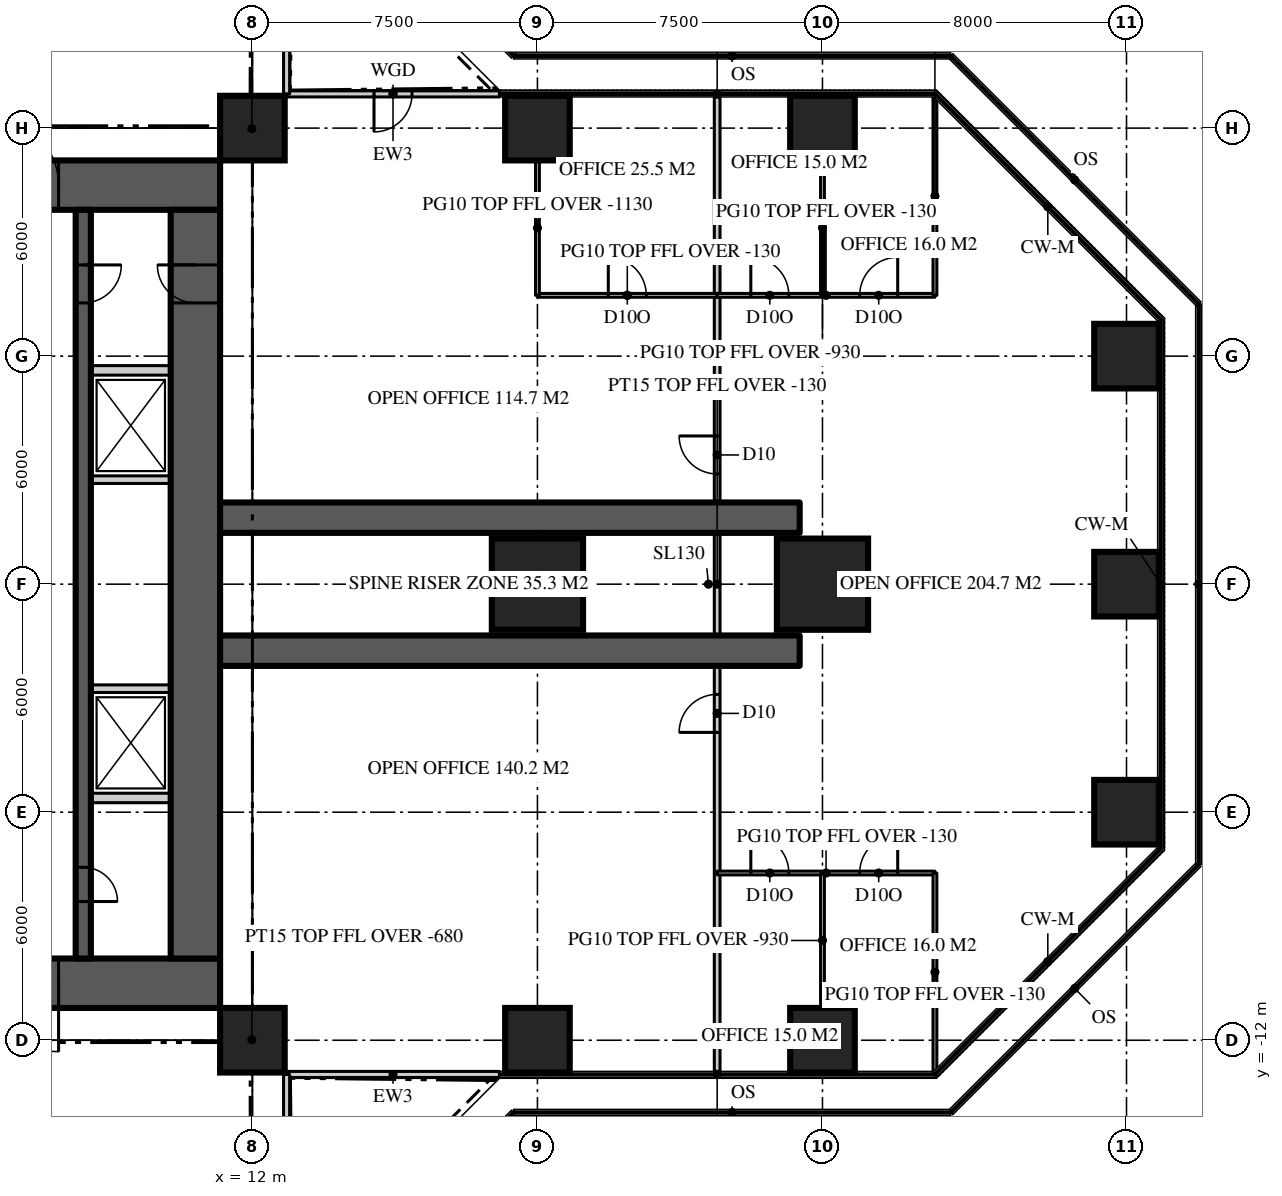
"""IFC4 building model, lengths in metres.
Left out: names, types, materials, properties, quantities, classifications, styles, units other than length and angle.
Written with IfcOpenShell. Run it as: python <this file> out.ifc"""

import sys

from ifc_helpers import new_model, si_unit, direction, frame, frame_2d, origin, origin_2d, place, context, subcontext, project, spatial, rectangle, extrude, element, fill, save


model = new_model("IFC4")
c1 = context("Model", 3, precision=1e-05, world=origin(), true_north=direction((0.0, 1.0)))
c2 = subcontext(c1, "Body", "Model", "MODEL_VIEW")
j1 = project(units=[si_unit("LENGTHUNIT", "METRE"), si_unit("PLANEANGLEUNIT", "RADIAN")], contexts=[c1])
p1 = place(None, origin())
s1 = spatial("IfcSite", under=j1, at=p1, CompositionType="ELEMENT")
p2 = place(p1, origin())
s2 = spatial("IfcBuilding", under=s1, at=p2, CompositionType="ELEMENT")
p3 = place(p2, frame((0.0, 0.0, 128.1)))
s3 = spatial("IfcBuildingStorey", under=s2, at=p3, CompositionType="ELEMENT", Elevation=128.1)
p4 = place(p3, frame((-11.15, 10.5, 0.0), z_axis=(0.0, 0.0, 1.0), x_axis=(1.0, 0.0, 0.0)))
e1 = element("IfcWall", 1, at=p4, inside=s3, PredefinedType="SHEAR", context=c2, shape_type="SweptSolid", body=[
    extrude(rectangle(XDim=22.3, YDim=1.3, at=frame_2d((11.15, 0.0))), origin(), (0.0, 0.0, 1.0), 3.9),
])
p5 = place(p4, frame((4.25, 0.0, 0.0)))
e2 = element("IfcOpeningElement", 2, at=p5, cuts=e1, PredefinedType="OPENING", context=c2, shape_type="SweptSolid", body=[
    extrude(rectangle(XDim=1.8, YDim=2.2, at=frame_2d((0.9, 1.1))), frame((0.0, 0.66, 0.0), z_axis=(0.0, -1.0, 0.0), x_axis=(1.0, 0.0, 0.0)), (0.0, 0.0, 1.0), 1.32),
])
p6 = place(p4, frame((16.25, 0.0, 0.0)))
e3 = element("IfcOpeningElement", 3, at=p6, cuts=e1, PredefinedType="OPENING", context=c2, shape_type="SweptSolid", body=[
    extrude(rectangle(XDim=1.8, YDim=2.2, at=frame_2d((0.9, 1.1))), frame((0.0, 0.66, 0.0), z_axis=(0.0, -1.0, 0.0), x_axis=(1.0, 0.0, 0.0)), (0.0, 0.0, 1.0), 1.32),
])
p7 = place(p3, frame((11.15, -10.5, 0.0), z_axis=(0.0, 0.0, 1.0), x_axis=(-1.0, 0.0, 0.0)))
e4 = element("IfcWall", 4, at=p7, inside=s3, PredefinedType="SHEAR", context=c2, shape_type="SweptSolid", body=[
    extrude(rectangle(XDim=22.3, YDim=1.3, at=frame_2d((11.15, 0.0))), origin(), (0.0, 0.0, 1.0), 3.9),
])
p8 = place(p7, frame((16.25, 0.0, 0.0)))
e5 = element("IfcOpeningElement", 5, at=p8, cuts=e4, PredefinedType="OPENING", context=c2, shape_type="SweptSolid", body=[
    extrude(rectangle(XDim=1.8, YDim=2.2, at=frame_2d((0.9, 1.1))), frame((0.0, 0.66, 0.0), z_axis=(0.0, -1.0, 0.0), x_axis=(1.0, 0.0, 0.0)), (0.0, 0.0, 1.0), 1.32),
])
p9 = place(p7, frame((4.25, 0.0, 0.0)))
e6 = element("IfcOpeningElement", 6, at=p9, cuts=e4, PredefinedType="OPENING", context=c2, shape_type="SweptSolid", body=[
    extrude(rectangle(XDim=1.8, YDim=2.2, at=frame_2d((0.9, 1.1))), frame((0.0, 0.66, 0.0), z_axis=(0.0, -1.0, 0.0), x_axis=(1.0, 0.0, 0.0)), (0.0, 0.0, 1.0), 1.32),
])
p10 = place(p3, frame((10.5, -9.85, 0.0), z_axis=(0.0, 0.0, 1.0), x_axis=(0.0, 1.0, 0.0)))
e7 = element("IfcWall", 7, at=p10, inside=s3, PredefinedType="SHEAR", context=c2, shape_type="SweptSolid", body=[
    extrude(rectangle(XDim=19.7, YDim=1.3, at=frame_2d((9.85, 0.0))), origin(), (0.0, 0.0, 1.0), 3.9),
])
p11 = place(p10, frame((17.25, 0.0, 0.0)))
e8 = element("IfcOpeningElement", 8, at=p11, cuts=e7, PredefinedType="OPENING", context=c2, shape_type="SweptSolid", body=[
    extrude(rectangle(XDim=1.0, YDim=2.2, at=frame_2d((0.5, 1.1))), frame((0.0, 0.66, 0.0), z_axis=(0.0, -1.0, 0.0), x_axis=(1.0, 0.0, 0.0)), (0.0, 0.0, 1.0), 1.32),
])
for number, where, z_axis, x_axis in (
    (9, (11.15, -1.75, 0.0), (0.0, 0.0, 1.0), (1.0, 0.0, 0.0)),
    (10, (11.15, 1.75, 0.0), (0.0, 0.0, 1.0), (1.0, 0.0, 0.0)),
):
    element("IfcWall", number, at=place(p3, frame(where, z_axis=z_axis, x_axis=x_axis)), inside=s3, PredefinedType="SHEAR", context=c2, shape_type="SweptSolid", body=[
        extrude(rectangle(XDim=15.25, YDim=0.8, at=frame_2d((7.625, 0.0))), origin(), (0.0, 0.0, 1.0), 3.9),
    ])
for number, where, z_axis, x_axis in (
    (11, (12.0, -12.0, 0.0), (0.0, 0.0, 1.0), (1.0, 0.0, 0.0)),
    (12, (19.5, -12.0, 0.0), (0.0, 0.0, 1.0), (1.0, 0.0, 0.0)),
    (13, (27.0, -12.0, 0.0), (0.0, 0.0, 1.0), (1.0, 0.0, 0.0)),
    (14, (35.0, -6.0, 0.0), (0.0, 0.0, 1.0), (1.0, 0.0, 0.0)),
):
    element("IfcColumn", number, at=place(p3, frame(where, z_axis=z_axis, x_axis=x_axis)), inside=s3, PredefinedType="COLUMN", context=c2, shape_type="SweptSolid", body=[
        extrude(rectangle(XDim=1.7, YDim=1.7, at=origin_2d()), origin(), (0.0, 0.0, 1.0), 3.9),
    ])
for number, where, z_axis, x_axis in (
    (15, (19.5, 0.0, 0.0), (0.0, 0.0, 1.0), (1.0, 0.0, 0.0)),
    (16, (27.0, 0.0, 0.0), (0.0, 0.0, 1.0), (1.0, 0.0, 0.0)),
):
    element("IfcColumn", number, at=place(p3, frame(where, z_axis=z_axis, x_axis=x_axis)), inside=s3, PredefinedType="COLUMN", context=c2, shape_type="SweptSolid", body=[
        extrude(rectangle(XDim=2.4, YDim=2.4, at=origin_2d()), origin(), (0.0, 0.0, 1.0), 3.9),
    ])
for number, where, z_axis, x_axis in (
    (17, (35.0, 0.0, 0.0), (0.0, 0.0, 1.0), (1.0, 0.0, 0.0)),
    (18, (35.0, 6.0, 0.0), (0.0, 0.0, 1.0), (1.0, 0.0, 0.0)),
    (19, (12.0, 12.0, 0.0), (0.0, 0.0, 1.0), (1.0, 0.0, 0.0)),
    (20, (19.5, 12.0, 0.0), (0.0, 0.0, 1.0), (1.0, 0.0, 0.0)),
    (21, (27.0, 12.0, 0.0), (0.0, 0.0, 1.0), (1.0, 0.0, 0.0)),
):
    element("IfcColumn", number, at=place(p3, frame(where, z_axis=z_axis, x_axis=x_axis)), inside=s3, PredefinedType="COLUMN", context=c2, shape_type="SweptSolid", body=[
        extrude(rectangle(XDim=1.7, YDim=1.7, at=origin_2d()), origin(), (0.0, 0.0, 1.0), 3.9),
    ])
p12 = place(p3, frame((12.9, -12.9, 0.0), z_axis=(0.0, 0.0, 1.0), x_axis=(1.0, 0.0, 0.0)))
e22 = element("IfcWall", 22, at=p12, inside=s3, PredefinedType="SOLIDWALL", context=c2, shape_type="SweptSolid", body=[
    extrude(rectangle(XDim=5.6, YDim=0.16, at=frame_2d((2.8, 0.0))), origin(), (0.0, 0.0, 1.0), 3.77),
])
p13 = place(p3, frame((18.5, 12.9, 0.0), z_axis=(0.0, 0.0, 1.0), x_axis=(-1.0, 0.0, 0.0)))
e23 = element("IfcWall", 23, at=p13, inside=s3, PredefinedType="SOLIDWALL", context=c2, shape_type="SweptSolid", body=[
    extrude(rectangle(XDim=5.6, YDim=0.16, at=frame_2d((2.8, 0.0))), origin(), (0.0, 0.0, 1.0), 3.77),
])
p14 = place(p13, frame((2.3, 0.0, 0.0)))
e24 = element("IfcOpeningElement", 24, at=p14, cuts=e23, PredefinedType="OPENING", context=c2, shape_type="SweptSolid", body=[
    extrude(rectangle(XDim=1.0, YDim=2.2, at=frame_2d((0.5, 1.1))), frame((0.0, 0.09, 0.0), z_axis=(0.0, -1.0, 0.0), x_axis=(1.0, 0.0, 0.0)), (0.0, 0.0, 1.0), 0.18),
])
p15 = place(p3, frame((12.9, 12.9, 0.0), z_axis=(0.0, 0.0, 1.0), x_axis=(0.0, 1.0, 0.0)))
e25 = element("IfcWall", 25, at=p15, inside=s3, PredefinedType="SOLIDWALL", context=c2, shape_type="SweptSolid", body=[
    extrude(rectangle(XDim=5.6, YDim=0.16, at=frame_2d((2.8, 0.0))), origin(), (0.0, 0.0, 1.0), 3.77),
])
p16 = place(p3, frame((12.9, -18.5, 0.0), z_axis=(0.0, 0.0, 1.0), x_axis=(0.0, 1.0, 0.0)))
e26 = element("IfcWall", 26, at=p16, inside=s3, PredefinedType="SOLIDWALL", context=c2, shape_type="SweptSolid", body=[
    extrude(rectangle(XDim=5.6, YDim=0.16, at=frame_2d((2.8, 0.0))), origin(), (0.0, 0.0, 1.0), 3.77),
])
p17 = place(p16, frame((2.3, 0.0, 0.0)))
e27 = element("IfcOpeningElement", 27, at=p17, cuts=e26, PredefinedType="OPENING", context=c2, shape_type="SweptSolid", body=[
    extrude(rectangle(XDim=1.0, YDim=2.2, at=frame_2d((0.5, 1.1))), frame((0.0, 0.09, 0.0), z_axis=(0.0, -1.0, 0.0), x_axis=(1.0, 0.0, 0.0)), (0.0, 0.0, 1.0), 0.18),
])
p18 = place(p3, frame((7.55, 9.85, 0.0), z_axis=(0.0, 0.0, 1.0), x_axis=(0.0, -1.0, 0.0)))
e28 = element("IfcWall", 28, at=p18, inside=s3, PredefinedType="SHEAR", context=c2, shape_type="SweptSolid", body=[
    extrude(rectangle(XDim=19.7, YDim=0.4, at=frame_2d((9.85, 0.0))), origin(), (0.0, 0.0, 1.0), 3.9),
])
p19 = place(p18, frame((1.45, 0.0, 0.0)))
e29 = element("IfcOpeningElement", 29, at=p19, cuts=e28, PredefinedType="OPENING", context=c2, shape_type="SweptSolid", body=[
    extrude(rectangle(XDim=1.0, YDim=2.2, at=frame_2d((0.5, 1.1))), frame((0.0, 0.21, 0.0), z_axis=(0.0, -1.0, 0.0), x_axis=(1.0, 0.0, 0.0)), (0.0, 0.0, 1.0), 0.42),
])
p20 = place(p18, frame((17.3, 0.0, 0.0)))
e30 = element("IfcOpeningElement", 30, at=p20, cuts=e28, PredefinedType="OPENING", context=c2, shape_type="SweptSolid", body=[
    extrude(rectangle(XDim=0.9, YDim=2.1, at=frame_2d((0.45, 1.05))), frame((0.0, 0.21, 0.0), z_axis=(0.0, -1.0, 0.0), x_axis=(1.0, 0.0, 0.0)), (0.0, 0.0, 1.0), 0.42),
])
for number, where, z_axis, x_axis in (
    (31, (7.75, 5.625, 0.0), (0.0, 0.0, 1.0), (1.0, 0.0, 0.0)),
    (32, (7.75, -5.625, 0.0), (0.0, 0.0, 1.0), (1.0, 0.0, 0.0)),
):
    element("IfcWall", number, at=place(p3, frame(where, z_axis=z_axis, x_axis=x_axis)), inside=s3, PredefinedType="SOLIDWALL", context=c2, shape_type="SweptSolid", body=[
        extrude(rectangle(XDim=2.1, YDim=0.25, at=frame_2d((1.05, 0.0))), origin(), (0.0, 0.0, 1.0), 3.7),
    ])
for number, where, z_axis, x_axis in (
    (33, (7.75, -2.75, 0.0), (0.0, 0.0, 1.0), (1.0, 0.0, 0.0)),
    (34, (7.75, 2.75, 0.0), (0.0, 0.0, 1.0), (1.0, 0.0, 0.0)),
):
    element("IfcWall", number, at=place(p3, frame(where, z_axis=z_axis, x_axis=x_axis)), inside=s3, PredefinedType="SOLIDWALL", context=c2, shape_type="SweptSolid", body=[
        extrude(rectangle(XDim=2.1, YDim=0.2, at=frame_2d((1.05, 0.0))), origin(), (0.0, 0.0, 1.0), 3.7),
    ])
p21 = place(p3, frame((24.229, -12.82, 0.0), z_axis=(0.0, 0.0, 1.0), x_axis=(0.0, 1.0, 0.0)))
e35 = element("IfcWall", 35, at=p21, inside=s3, PredefinedType="PARTITIONING", context=c2, shape_type="SweptSolid", body=[
    extrude(rectangle(XDim=25.64, YDim=0.15, at=frame_2d((12.82, 0.0))), origin(), (0.0, 0.0, 1.0), 3.77),
])
p22 = place(p21, frame((15.72, 0.0, 0.0)))
e36 = element("IfcOpeningElement", 36, at=p22, cuts=e35, PredefinedType="OPENING", context=c2, shape_type="SweptSolid", body=[
    extrude(rectangle(XDim=1.0, YDim=2.2, at=frame_2d((0.5, 1.1))), frame((0.0, 0.085, 0.0), z_axis=(0.0, -1.0, 0.0), x_axis=(1.0, 0.0, 0.0)), (0.0, 0.0, 1.0), 0.17),
])
p23 = place(p21, frame((8.92, 0.0, 0.0)))
e37 = element("IfcOpeningElement", 37, at=p23, cuts=e35, PredefinedType="OPENING", context=c2, shape_type="SweptSolid", body=[
    extrude(rectangle(XDim=1.0, YDim=2.2, at=frame_2d((0.5, 1.1))), frame((0.0, 0.085, 0.0), z_axis=(0.0, -1.0, 0.0), x_axis=(1.0, 0.0, 0.0)), (0.0, 0.0, 1.0), 0.17),
])
p24 = place(p3, frame((19.5, 7.6, 0.0), z_axis=(0.0, 0.0, 1.0), x_axis=(1.0, 0.0, 0.0)))
e38 = element("IfcWall", 38, at=p24, inside=s3, PredefinedType="PARTITIONING", context=c2, shape_type="SweptSolid", body=[
    extrude(rectangle(XDim=4.729, YDim=0.1, at=frame_2d((2.365, 0.0))), origin(), (0.0, 0.0, 1.0), 3.77),
])
p25 = place(p24, frame((1.865, 0.0, 0.0)))
e39 = element("IfcOpeningElement", 39, at=p25, cuts=e38, PredefinedType="OPENING", context=c2, shape_type="SweptSolid", body=[
    extrude(rectangle(XDim=1.0, YDim=2.2, at=frame_2d((0.5, 1.1))), frame((0.0, 0.06, 0.0), z_axis=(0.0, -1.0, 0.0), x_axis=(1.0, 0.0, 0.0)), (0.0, 0.0, 1.0), 0.12),
])
p26 = place(p3, frame((24.229, 7.6, 0.0), z_axis=(0.0, 0.0, 1.0), x_axis=(1.0, 0.0, 0.0)))
e40 = element("IfcWall", 40, at=p26, inside=s3, PredefinedType="PARTITIONING", context=c2, shape_type="SweptSolid", body=[
    extrude(rectangle(XDim=5.73, YDim=0.1, at=frame_2d((2.865, 0.0))), origin(), (0.0, 0.0, 1.0), 3.77),
])
p27 = place(p26, frame((0.885, 0.0, 0.0)))
e41 = element("IfcOpeningElement", 41, at=p27, cuts=e40, PredefinedType="OPENING", context=c2, shape_type="SweptSolid", body=[
    extrude(rectangle(XDim=1.0, YDim=2.2, at=frame_2d((0.5, 1.1))), frame((0.0, 0.06, 0.0), z_axis=(0.0, -1.0, 0.0), x_axis=(1.0, 0.0, 0.0)), (0.0, 0.0, 1.0), 0.12),
])
p28 = place(p26, frame((3.75, 0.0, 0.0)))
e42 = element("IfcOpeningElement", 42, at=p28, cuts=e40, PredefinedType="OPENING", context=c2, shape_type="SweptSolid", body=[
    extrude(rectangle(XDim=1.0, YDim=2.2, at=frame_2d((0.5, 1.1))), frame((0.0, 0.06, 0.0), z_axis=(0.0, -1.0, 0.0), x_axis=(1.0, 0.0, 0.0)), (0.0, 0.0, 1.0), 0.12),
])
p29 = place(p3, frame((19.5, 7.6, 0.0), z_axis=(0.0, 0.0, 1.0), x_axis=(0.0, 1.0, 0.0)))
e43 = element("IfcWall", 43, at=p29, inside=s3, PredefinedType="PARTITIONING", context=c2, shape_type="SweptSolid", body=[
    extrude(rectangle(XDim=3.55, YDim=0.1, at=frame_2d((1.775, 0.0))), origin(), (0.0, 0.0, 1.0), 2.77),
])
p30 = place(p3, frame((27.0, 7.6, 0.0), z_axis=(0.0, 0.0, 1.0), x_axis=(0.0, 1.0, 0.0)))
e44 = element("IfcWall", 44, at=p30, inside=s3, PredefinedType="PARTITIONING", context=c2, shape_type="SweptSolid", body=[
    extrude(rectangle(XDim=3.55, YDim=0.1, at=frame_2d((1.775, 0.0))), origin(), (0.0, 0.0, 1.0), 2.97),
])
p31 = place(p3, frame((29.959, 7.6, 0.0), z_axis=(0.0, 0.0, 1.0), x_axis=(0.0, 1.0, 0.0)))
e45 = element("IfcWall", 45, at=p31, inside=s3, PredefinedType="PARTITIONING", context=c2, shape_type="SweptSolid", body=[
    extrude(rectangle(XDim=5.22, YDim=0.1, at=frame_2d((2.61, 0.0))), origin(), (0.0, 0.0, 1.0), 3.77),
])
p32 = place(p3, frame((24.229, -7.6, 0.0), z_axis=(0.0, 0.0, 1.0), x_axis=(1.0, 0.0, 0.0)))
e46 = element("IfcWall", 46, at=p32, inside=s3, PredefinedType="PARTITIONING", context=c2, shape_type="SweptSolid", body=[
    extrude(rectangle(XDim=5.73, YDim=0.1, at=frame_2d((2.865, 0.0))), origin(), (0.0, 0.0, 1.0), 3.77),
])
p33 = place(p32, frame((0.885, 0.0, 0.0)))
e47 = element("IfcOpeningElement", 47, at=p33, cuts=e46, PredefinedType="OPENING", context=c2, shape_type="SweptSolid", body=[
    extrude(rectangle(XDim=1.0, YDim=2.2, at=frame_2d((0.5, 1.1))), frame((0.0, 0.06, 0.0), z_axis=(0.0, -1.0, 0.0), x_axis=(1.0, 0.0, 0.0)), (0.0, 0.0, 1.0), 0.12),
])
p34 = place(p32, frame((3.75, 0.0, 0.0)))
e48 = element("IfcOpeningElement", 48, at=p34, cuts=e46, PredefinedType="OPENING", context=c2, shape_type="SweptSolid", body=[
    extrude(rectangle(XDim=1.0, YDim=2.2, at=frame_2d((0.5, 1.1))), frame((0.0, 0.06, 0.0), z_axis=(0.0, -1.0, 0.0), x_axis=(1.0, 0.0, 0.0)), (0.0, 0.0, 1.0), 0.12),
])
p35 = place(p3, frame((27.0, -7.6, 0.0), z_axis=(0.0, 0.0, 1.0), x_axis=(0.0, -1.0, 0.0)))
e49 = element("IfcWall", 49, at=p35, inside=s3, PredefinedType="PARTITIONING", context=c2, shape_type="SweptSolid", body=[
    extrude(rectangle(XDim=3.55, YDim=0.1, at=frame_2d((1.775, 0.0))), origin(), (0.0, 0.0, 1.0), 2.97),
])
p36 = place(p3, frame((29.959, -7.6, 0.0), z_axis=(0.0, 0.0, 1.0), x_axis=(0.0, -1.0, 0.0)))
e50 = element("IfcWall", 50, at=p36, inside=s3, PredefinedType="PARTITIONING", context=c2, shape_type="SweptSolid", body=[
    extrude(rectangle(XDim=5.22, YDim=0.1, at=frame_2d((2.61, 0.0))), origin(), (0.0, 0.0, 1.0), 3.77),
])
for number, where, z_axis, x_axis in (
    (51, (11.15, 11.15, 0.0), (0.0, 0.0, 1.0), (0.707, 0.707, 0.0)),
    (52, (11.15, -11.15, 0.0), (0.0, 0.0, 1.0), (0.707, -0.707, 0.0)),
):
    element("IfcWall", number, at=place(p3, frame(where, z_axis=z_axis, x_axis=x_axis)), inside=s3, PredefinedType="PARTITIONING", context=c2, shape_type="SweptSolid", body=[
        extrude(rectangle(XDim=2.362, YDim=0.15, at=frame_2d((1.181, 0.0))), origin(), (0.0, 0.0, 1.0), 3.22),
    ])
p37 = place(p14, origin())
e53 = element("IfcDoor", 53, at=p37, inside=s3, OperationType="SINGLE_SWING_RIGHT", PredefinedType="DOOR", context=c2, shape_type="SweptSolid", body=[
    extrude(rectangle(XDim=1.0, YDim=2.2, at=frame_2d((0.5, 1.1))), frame((0.0, 0.025, 0.0), z_axis=(0.0, -1.0, 0.0), x_axis=(1.0, 0.0, 0.0)), (0.0, 0.0, 1.0), 0.05),
])
fill(e24, e53)
p38 = place(p6, origin())
e54 = element("IfcDoor", 54, at=p38, inside=s3, OperationType="DOUBLE_DOOR_DOUBLE_SWING", PredefinedType="DOOR", context=c2, shape_type="SweptSolid", body=[
    extrude(rectangle(XDim=1.8, YDim=2.2, at=frame_2d((0.9, 1.1))), frame((0.0, 0.025, 0.0), z_axis=(0.0, -1.0, 0.0), x_axis=(1.0, 0.0, 0.0)), (0.0, 0.0, 1.0), 0.05),
])
fill(e3, e54)
p39 = place(p9, origin())
e55 = element("IfcDoor", 55, at=p39, inside=s3, OperationType="DOUBLE_DOOR_DOUBLE_SWING", PredefinedType="DOOR", context=c2, shape_type="SweptSolid", body=[
    extrude(rectangle(XDim=1.8, YDim=2.2, at=frame_2d((0.9, 1.1))), frame((0.0, 0.025, 0.0), z_axis=(0.0, -1.0, 0.0), x_axis=(1.0, 0.0, 0.0)), (0.0, 0.0, 1.0), 0.05),
])
fill(e6, e55)
p40 = place(p19, origin())
e56 = element("IfcDoor", 56, at=p40, inside=s3, OperationType="SINGLE_SWING_LEFT", PredefinedType="DOOR", context=c2, shape_type="SweptSolid", body=[
    extrude(rectangle(XDim=1.0, YDim=2.2, at=frame_2d((0.5, 1.1))), frame((0.0, 0.025, 0.0), z_axis=(0.0, -1.0, 0.0), x_axis=(1.0, 0.0, 0.0)), (0.0, 0.0, 1.0), 0.05),
])
fill(e29, e56)
p41 = place(p11, origin())
e57 = element("IfcDoor", 57, at=p41, inside=s3, OperationType="SINGLE_SWING_RIGHT", PredefinedType="DOOR", context=c2, shape_type="SweptSolid", body=[
    extrude(rectangle(XDim=1.0, YDim=2.2, at=frame_2d((0.5, 1.1))), frame((0.0, 0.025, 0.0), z_axis=(0.0, -1.0, 0.0), x_axis=(1.0, 0.0, 0.0)), (0.0, 0.0, 1.0), 0.05),
])
fill(e8, e57)
p42 = place(p20, origin())
e58 = element("IfcDoor", 58, at=p42, inside=s3, OperationType="SINGLE_SWING_RIGHT", PredefinedType="DOOR", context=c2, shape_type="SweptSolid", body=[
    extrude(rectangle(XDim=0.9, YDim=2.1, at=frame_2d((0.45, 1.05))), frame((0.0, 0.025, 0.0), z_axis=(0.0, -1.0, 0.0), x_axis=(1.0, 0.0, 0.0)), (0.0, 0.0, 1.0), 0.05),
])
fill(e30, e58)
p43 = place(p22, origin())
e59 = element("IfcDoor", 59, at=p43, inside=s3, OperationType="SINGLE_SWING_RIGHT", PredefinedType="DOOR", context=c2, shape_type="SweptSolid", body=[
    extrude(rectangle(XDim=1.0, YDim=2.2, at=frame_2d((0.5, 1.1))), frame((0.0, 0.025, 0.0), z_axis=(0.0, -1.0, 0.0), x_axis=(1.0, 0.0, 0.0)), (0.0, 0.0, 1.0), 0.05),
])
fill(e36, e59)
p44 = place(p23, origin())
e60 = element("IfcDoor", 60, at=p44, inside=s3, OperationType="SINGLE_SWING_LEFT", PredefinedType="DOOR", context=c2, shape_type="SweptSolid", body=[
    extrude(rectangle(XDim=1.0, YDim=2.2, at=frame_2d((0.5, 1.1))), frame((0.0, 0.025, 0.0), z_axis=(0.0, -1.0, 0.0), x_axis=(1.0, 0.0, 0.0)), (0.0, 0.0, 1.0), 0.05),
])
fill(e37, e60)
p45 = place(p25, origin())
e61 = element("IfcDoor", 61, at=p45, inside=s3, OperationType="SINGLE_SWING_LEFT", PredefinedType="DOOR", context=c2, shape_type="SweptSolid", body=[
    extrude(rectangle(XDim=1.0, YDim=2.2, at=frame_2d((0.5, 1.1))), frame((0.0, 0.025, 0.0), z_axis=(0.0, -1.0, 0.0), x_axis=(1.0, 0.0, 0.0)), (0.0, 0.0, 1.0), 0.05),
])
fill(e39, e61)
p46 = place(p27, origin())
e62 = element("IfcDoor", 62, at=p46, inside=s3, OperationType="SINGLE_SWING_LEFT", PredefinedType="DOOR", context=c2, shape_type="SweptSolid", body=[
    extrude(rectangle(XDim=1.0, YDim=2.2, at=frame_2d((0.5, 1.1))), frame((0.0, 0.025, 0.0), z_axis=(0.0, -1.0, 0.0), x_axis=(1.0, 0.0, 0.0)), (0.0, 0.0, 1.0), 0.05),
])
fill(e41, e62)
p47 = place(p28, origin())
e63 = element("IfcDoor", 63, at=p47, inside=s3, OperationType="SINGLE_SWING_RIGHT", PredefinedType="DOOR", context=c2, shape_type="SweptSolid", body=[
    extrude(rectangle(XDim=1.0, YDim=2.2, at=frame_2d((0.5, 1.1))), frame((0.0, 0.025, 0.0), z_axis=(0.0, -1.0, 0.0), x_axis=(1.0, 0.0, 0.0)), (0.0, 0.0, 1.0), 0.05),
])
fill(e42, e63)
p48 = place(p33, origin())
e64 = element("IfcDoor", 64, at=p48, inside=s3, OperationType="SINGLE_SWING_LEFT", PredefinedType="DOOR", context=c2, shape_type="SweptSolid", body=[
    extrude(rectangle(XDim=1.0, YDim=2.2, at=frame_2d((0.5, 1.1))), frame((0.0, 0.025, 0.0), z_axis=(0.0, -1.0, 0.0), x_axis=(1.0, 0.0, 0.0)), (0.0, 0.0, 1.0), 0.05),
])
fill(e47, e64)
p49 = place(p34, origin())
e65 = element("IfcDoor", 65, at=p49, inside=s3, OperationType="SINGLE_SWING_RIGHT", PredefinedType="DOOR", context=c2, shape_type="SweptSolid", body=[
    extrude(rectangle(XDim=1.0, YDim=2.2, at=frame_2d((0.5, 1.1))), frame((0.0, 0.025, 0.0), z_axis=(0.0, -1.0, 0.0), x_axis=(1.0, 0.0, 0.0)), (0.0, 0.0, 1.0), 0.05),
])
fill(e48, e65)
save(model, sys.argv[1])
